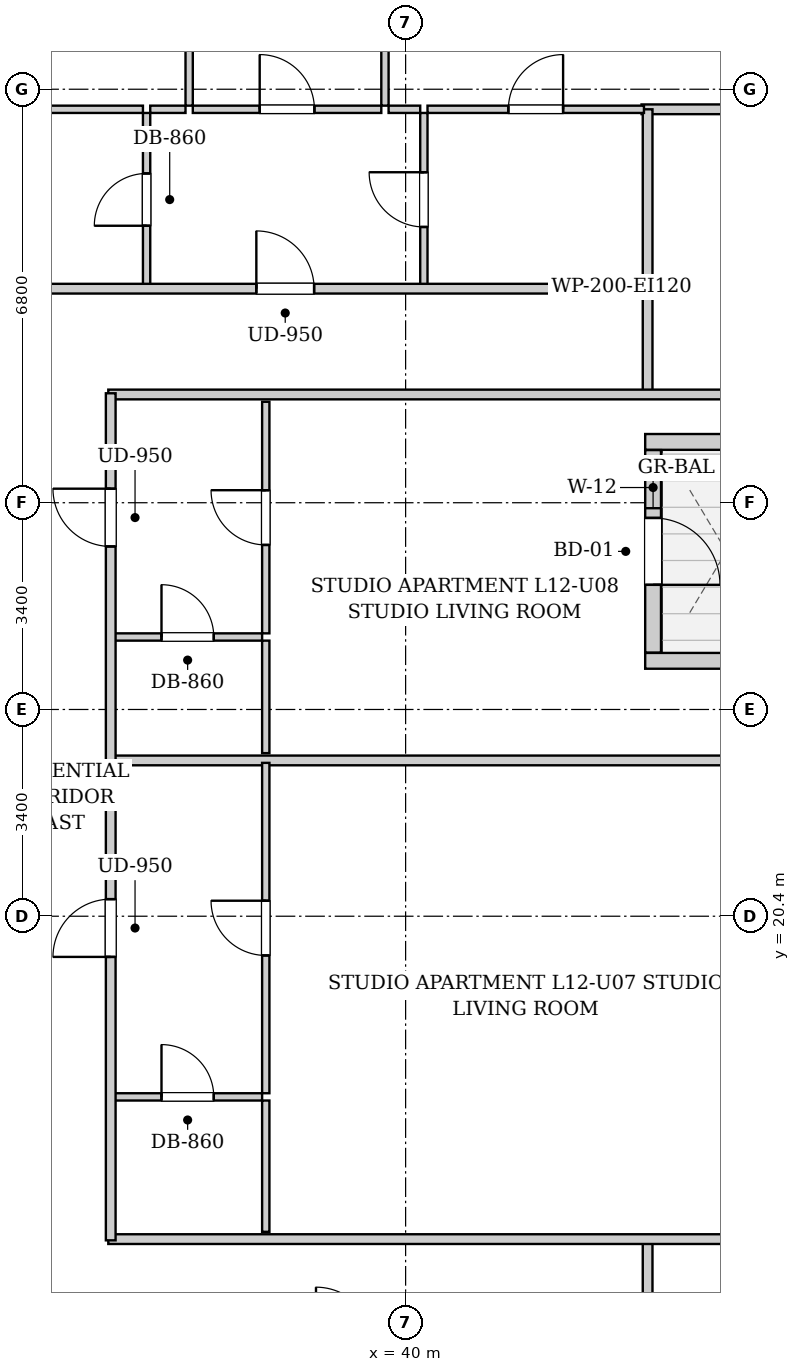
"""IFC4 building model, lengths in metres.
Left out: names, types, materials, properties, quantities, classifications, styles, units other than length and angle.
Written with IfcOpenShell. Run it as: python <this file> out.ifc"""

import sys

from ifc_helpers import new_model, si_unit, direction, frame, frame_2d, origin, place, context, subcontext, project, spatial, rectangle, extrude, element, fill, save


model = new_model("IFC4")
c1 = context("Model", 3, precision=1e-05, world=origin(), true_north=direction((0.0, 1.0)))
c2 = subcontext(c1, "Body", "Model", "MODEL_VIEW")
j1 = project(units=[si_unit("LENGTHUNIT", "METRE"), si_unit("PLANEANGLEUNIT", "RADIAN")], contexts=[c1])
p1 = place(None, origin())
s1 = spatial("IfcSite", under=j1, at=p1, CompositionType="ELEMENT")
p2 = place(p1, origin())
s2 = spatial("IfcBuilding", under=s1, at=p2, CompositionType="ELEMENT")
p3 = place(p2, frame((0.0, 0.0, 48.2)))
s3 = spatial("IfcBuildingStorey", under=s2, at=p3, CompositionType="ELEMENT", Elevation=48.2)
p4 = place(p3, frame((46.34, 28.2, 0.0), z_axis=(0.0, 0.0, 1.0), x_axis=(-1.0, 0.0, 0.0)))
e1 = element("IfcWall", 1, at=p4, inside=s3, PredefinedType="SOLIDWALL", context=c2, shape_type="SweptSolid", body=[
    extrude(rectangle(XDim=2.4, YDim=0.26, at=frame_2d((1.2, 0.0))), origin(), (0.0, 0.0, 1.0), 2.94),
])
p5 = place(p3, frame((44.07, 28.066, 0.0), z_axis=(0.0, 0.0, 1.0), x_axis=(0.0, -1.0, 0.0)))
e2 = element("IfcWall", 2, at=p5, inside=s3, PredefinedType="SOLIDWALL", context=c2, shape_type="SweptSolid", body=[
    extrude(rectangle(XDim=3.332, YDim=0.26, at=frame_2d((1.666, 0.0))), origin(), (0.0, 0.0, 1.0), 2.94),
])
p6 = place(p5, frame((1.116, 0.0, 0.0)))
e3 = element("IfcOpeningElement", 3, at=p6, cuts=e2, PredefinedType="OPENING", context=c2, shape_type="SweptSolid", body=[
    extrude(rectangle(XDim=1.1, YDim=2.0, at=frame_2d((0.55, 1.0))), frame((0.0, 0.14, 0.0), z_axis=(0.0, -1.0, 0.0), x_axis=(1.0, 0.0, 0.0)), (0.0, 0.0, 1.0), 0.28),
])
p7 = place(p5, frame((0.276, 0.0, 0.55)))
e4 = element("IfcOpeningElement", 4, at=p7, cuts=e2, PredefinedType="OPENING", context=c2, shape_type="SweptSolid", body=[
    extrude(rectangle(XDim=0.68, YDim=1.2, at=frame_2d((0.34, 0.6))), frame((0.0, 0.14, 0.0), z_axis=(0.0, -1.0, 0.0), x_axis=(1.0, 0.0, 0.0)), (0.0, 0.0, 1.0), 0.28),
])
p8 = place(p3, frame((43.94, 24.6, 0.0), z_axis=(0.0, 0.0, 1.0), x_axis=(1.0, 0.0, 0.0)))
e5 = element("IfcWall", 5, at=p8, inside=s3, PredefinedType="SOLIDWALL", context=c2, shape_type="SweptSolid", body=[
    extrude(rectangle(XDim=2.4, YDim=0.26, at=frame_2d((1.2, 0.0))), origin(), (0.0, 0.0, 1.0), 2.94),
])
for number, where, z_axis, x_axis in (
    (6, (43.98, 13.35, 0.0), (0.0, 0.0, 1.0), (0.0, 1.0, 0.0)),
    (7, (43.98, 28.98, 0.0), (0.0, 0.0, 1.0), (0.0, 1.0, 0.0)),
):
    element("IfcWall", number, at=place(p3, frame(where, z_axis=z_axis, x_axis=x_axis)), inside=s3, PredefinedType="PARTITIONING", context=c2, shape_type="SweptSolid", body=[
        extrude(rectangle(XDim=1.74, YDim=0.16, at=frame_2d((0.87, 0.0))), origin(), (0.0, 0.0, 1.0), 2.94),
    ])
for number, where, z_axis, x_axis in (
    (8, (35.11, 15.09, 0.0), (0.0, 0.0, 1.0), (1.0, 0.0, 0.0)),
    (9, (35.11, 28.98, 0.0), (0.0, 0.0, 1.0), (1.0, 0.0, 0.0)),
):
    element("IfcWall", number, at=place(p3, frame(where, z_axis=z_axis, x_axis=x_axis)), inside=s3, PredefinedType="PARTITIONING", context=c2, shape_type="SweptSolid", body=[
        extrude(rectangle(XDim=11.11, YDim=0.16, at=frame_2d((5.555, 0.0))), origin(), (0.0, 0.0, 1.0), 2.232),
    ])
p9 = place(p3, frame((43.88, 33.67, 0.0), z_axis=(0.0, 0.0, 1.0), x_axis=(1.0, 0.0, 0.0)))
e10 = element("IfcWall", 10, at=p9, inside=s3, PredefinedType="PARTITIONING", context=c2, shape_type="SweptSolid", body=[
    extrude(rectangle(XDim=2.34, YDim=0.16, at=frame_2d((1.17, 0.0))), origin(), (0.0, 0.0, 1.0), 2.94),
])
p10 = place(p3, frame((43.98, 30.76, 0.0), z_axis=(0.0, 0.0, 1.0), x_axis=(0.0, 1.0, 0.0)))
e11 = element("IfcWall", 11, at=p10, inside=s3, PredefinedType="PARTITIONING", context=c2, shape_type="SweptSolid", body=[
    extrude(rectangle(XDim=2.91, YDim=0.16, at=frame_2d((1.455, 0.0))), origin(), (0.0, 0.0, 1.0), 2.94),
])
p11 = place(p3, frame((35.74, 30.76, 0.0), z_axis=(0.0, 0.0, 1.0), x_axis=(0.0, 1.0, 0.0)))
e12 = element("IfcWall", 12, at=p11, inside=s3, PredefinedType="PARTITIONING", context=c2, shape_type="SweptSolid", body=[
    extrude(rectangle(XDim=2.85, YDim=0.12, at=frame_2d((1.425, 0.0))), origin(), (0.0, 0.0, 1.0), 2.94),
])
p12 = place(p11, frame((0.995, 0.0, 0.0)))
e13 = element("IfcOpeningElement", 13, at=p12, cuts=e12, PredefinedType="OPENING", context=c2, shape_type="SweptSolid", body=[
    extrude(rectangle(XDim=0.86, YDim=2.05, at=frame_2d((0.43, 1.025))), frame((0.0, 0.07, 0.0), z_axis=(0.0, -1.0, 0.0), x_axis=(1.0, 0.0, 0.0)), (0.0, 0.0, 1.0), 0.14),
])
p13 = place(p3, frame((33.28, 33.67, 0.0), z_axis=(0.0, 0.0, 1.0), x_axis=(1.0, 0.0, 0.0)))
e14 = element("IfcWall", 14, at=p13, inside=s3, PredefinedType="PARTITIONING", context=c2, shape_type="SweptSolid", body=[
    extrude(rectangle(XDim=2.4, YDim=0.12, at=frame_2d((1.2, 0.0))), origin(), (0.0, 0.0, 1.0), 2.94),
])
p14 = place(p3, frame((40.3, 30.76, 0.0), z_axis=(0.0, 0.0, 1.0), x_axis=(0.0, 1.0, 0.0)))
e15 = element("IfcWall", 15, at=p14, inside=s3, PredefinedType="PARTITIONING", context=c2, shape_type="SweptSolid", body=[
    extrude(rectangle(XDim=2.85, YDim=0.12, at=frame_2d((1.425, 0.0))), origin(), (0.0, 0.0, 1.0), 2.94),
])
p15 = place(p14, frame((0.975, 0.0, 0.0)))
e16 = element("IfcOpeningElement", 16, at=p15, cuts=e15, PredefinedType="OPENING", context=c2, shape_type="SweptSolid", body=[
    extrude(rectangle(XDim=0.9, YDim=2.05, at=frame_2d((0.45, 1.025))), frame((0.0, 0.07, 0.0), z_axis=(0.0, -1.0, 0.0), x_axis=(1.0, 0.0, 0.0)), (0.0, 0.0, 1.0), 0.14),
])
p16 = place(p3, frame((35.8, 33.67, 0.0), z_axis=(0.0, 0.0, 1.0), x_axis=(1.0, 0.0, 0.0)))
e17 = element("IfcWall", 17, at=p16, inside=s3, PredefinedType="PARTITIONING", context=c2, shape_type="SweptSolid", body=[
    extrude(rectangle(XDim=0.58, YDim=0.12, at=frame_2d((0.29, 0.0))), origin(), (0.0, 0.0, 1.0), 2.94),
])
p17 = place(p3, frame((36.5, 33.67, 0.0), z_axis=(0.0, 0.0, 1.0), x_axis=(1.0, 0.0, 0.0)))
e18 = element("IfcWall", 18, at=p17, inside=s3, PredefinedType="PARTITIONING", context=c2, shape_type="SweptSolid", body=[
    extrude(rectangle(XDim=3.1, YDim=0.12, at=frame_2d((1.55, 0.0))), origin(), (0.0, 0.0, 1.0), 2.94),
])
p18 = place(p17, frame((1.1, 0.0, 0.0)))
e19 = element("IfcOpeningElement", 19, at=p18, cuts=e18, PredefinedType="OPENING", context=c2, shape_type="SweptSolid", body=[
    extrude(rectangle(XDim=0.9, YDim=2.05, at=frame_2d((0.45, 1.025))), frame((0.0, 0.07, 0.0), z_axis=(0.0, -1.0, 0.0), x_axis=(1.0, 0.0, 0.0)), (0.0, 0.0, 1.0), 0.14),
])
p19 = place(p3, frame((39.72, 33.67, 0.0), z_axis=(0.0, 0.0, 1.0), x_axis=(1.0, 0.0, 0.0)))
e20 = element("IfcWall", 20, at=p19, inside=s3, PredefinedType="PARTITIONING", context=c2, shape_type="SweptSolid", body=[
    extrude(rectangle(XDim=0.52, YDim=0.12, at=frame_2d((0.26, 0.0))), origin(), (0.0, 0.0, 1.0), 2.94),
])
p20 = place(p3, frame((40.36, 33.67, 0.0), z_axis=(0.0, 0.0, 1.0), x_axis=(1.0, 0.0, 0.0)))
e21 = element("IfcWall", 21, at=p20, inside=s3, PredefinedType="PARTITIONING", context=c2, shape_type="SweptSolid", body=[
    extrude(rectangle(XDim=3.56, YDim=0.12, at=frame_2d((1.78, 0.0))), origin(), (0.0, 0.0, 1.0), 2.94),
])
p21 = place(p20, frame((1.33, 0.0, 0.0)))
e22 = element("IfcOpeningElement", 22, at=p21, cuts=e21, PredefinedType="OPENING", context=c2, shape_type="SweptSolid", body=[
    extrude(rectangle(XDim=0.9, YDim=2.05, at=frame_2d((0.45, 1.025))), frame((0.0, 0.07, 0.0), z_axis=(0.0, -1.0, 0.0), x_axis=(1.0, 0.0, 0.0)), (0.0, 0.0, 1.0), 0.14),
])
p22 = place(p3, frame((36.44, 33.73, 0.0), z_axis=(0.0, 0.0, 1.0), x_axis=(0.0, 1.0, 0.0)))
e23 = element("IfcWall", 23, at=p22, inside=s3, PredefinedType="PARTITIONING", context=c2, shape_type="SweptSolid", body=[
    extrude(rectangle(XDim=11.44, YDim=0.12, at=frame_2d((5.72, 0.0))), origin(), (0.0, 0.0, 1.0), 2.94),
])
p23 = place(p22, frame((5.27, 0.0, 0.0)))
e24 = element("IfcOpeningElement", 24, at=p23, cuts=e23, PredefinedType="OPENING", context=c2, shape_type="SweptSolid", body=[
    extrude(rectangle(XDim=0.9, YDim=2.05, at=frame_2d((0.45, 1.025))), frame((0.0, 0.07, 0.0), z_axis=(0.0, -1.0, 0.0), x_axis=(1.0, 0.0, 0.0)), (0.0, 0.0, 1.0), 0.14),
])
p24 = place(p3, frame((39.66, 33.73, 0.0), z_axis=(0.0, 0.0, 1.0), x_axis=(0.0, 1.0, 0.0)))
e25 = element("IfcWall", 25, at=p24, inside=s3, PredefinedType="PARTITIONING", context=c2, shape_type="SweptSolid", body=[
    extrude(rectangle(XDim=11.44, YDim=0.12, at=frame_2d((5.72, 0.0))), origin(), (0.0, 0.0, 1.0), 2.94),
])
p25 = place(p24, frame((5.27, 0.0, 0.0)))
e26 = element("IfcOpeningElement", 26, at=p25, cuts=e25, PredefinedType="OPENING", context=c2, shape_type="SweptSolid", body=[
    extrude(rectangle(XDim=0.9, YDim=2.05, at=frame_2d((0.45, 1.025))), frame((0.0, 0.07, 0.0), z_axis=(0.0, -1.0, 0.0), x_axis=(1.0, 0.0, 0.0)), (0.0, 0.0, 1.0), 0.14),
])
p26 = place(p3, frame((35.19, 22.962, 0.0), z_axis=(0.0, 0.0, 1.0), x_axis=(1.0, 0.0, 0.0)))
e27 = element("IfcWall", 27, at=p26, inside=s3, PredefinedType="PARTITIONING", context=c2, shape_type="SweptSolid", body=[
    extrude(rectangle(XDim=11.03, YDim=0.16, at=frame_2d((5.515, 0.0))), origin(), (0.0, 0.0, 1.0), 2.94),
])
p27 = place(p3, frame((35.19, 17.429, 0.0), z_axis=(0.0, 0.0, 1.0), x_axis=(1.0, 0.0, 0.0)))
e28 = element("IfcWall", 28, at=p27, inside=s3, PredefinedType="PARTITIONING", context=c2, shape_type="SweptSolid", body=[
    extrude(rectangle(XDim=2.45, YDim=0.12, at=frame_2d((1.225, 0.0))), origin(), (0.0, 0.0, 1.0), 2.94),
])
p28 = place(p27, frame((0.795, 0.0, 0.0)))
e29 = element("IfcOpeningElement", 29, at=p28, cuts=e28, PredefinedType="OPENING", context=c2, shape_type="SweptSolid", body=[
    extrude(rectangle(XDim=0.86, YDim=2.05, at=frame_2d((0.43, 1.025))), frame((0.0, 0.07, 0.0), z_axis=(0.0, -1.0, 0.0), x_axis=(1.0, 0.0, 0.0)), (0.0, 0.0, 1.0), 0.14),
])
p29 = place(p3, frame((37.7, 15.21, 0.0), z_axis=(0.0, 0.0, 1.0), x_axis=(0.0, 1.0, 0.0)))
e30 = element("IfcWall", 30, at=p29, inside=s3, PredefinedType="PARTITIONING", context=c2, shape_type="SweptSolid", body=[
    extrude(rectangle(XDim=2.159, YDim=0.12, at=frame_2d((1.08, 0.0))), origin(), (0.0, 0.0, 1.0), 2.94),
])
p30 = place(p3, frame((37.7, 17.489, 0.0), z_axis=(0.0, 0.0, 1.0), x_axis=(0.0, 1.0, 0.0)))
e31 = element("IfcWall", 31, at=p30, inside=s3, PredefinedType="PARTITIONING", context=c2, shape_type="SweptSolid", body=[
    extrude(rectangle(XDim=5.433, YDim=0.12, at=frame_2d((2.717, 0.0))), origin(), (0.0, 0.0, 1.0), 2.94),
])
p31 = place(p30, frame((2.266, 0.0, 0.0)))
e32 = element("IfcOpeningElement", 32, at=p31, cuts=e31, PredefinedType="OPENING", context=c2, shape_type="SweptSolid", body=[
    extrude(rectangle(XDim=0.9, YDim=2.05, at=frame_2d((0.45, 1.025))), frame((0.0, 0.07, 0.0), z_axis=(0.0, -1.0, 0.0), x_axis=(1.0, 0.0, 0.0)), (0.0, 0.0, 1.0), 0.14),
])
p32 = place(p3, frame((35.19, 24.992, 0.0), z_axis=(0.0, 0.0, 1.0), x_axis=(1.0, 0.0, 0.0)))
e33 = element("IfcWall", 33, at=p32, inside=s3, PredefinedType="PARTITIONING", context=c2, shape_type="SweptSolid", body=[
    extrude(rectangle(XDim=2.45, YDim=0.12, at=frame_2d((1.225, 0.0))), origin(), (0.0, 0.0, 1.0), 2.94),
])
p33 = place(p32, frame((0.795, 0.0, 0.0)))
e34 = element("IfcOpeningElement", 34, at=p33, cuts=e33, PredefinedType="OPENING", context=c2, shape_type="SweptSolid", body=[
    extrude(rectangle(XDim=0.86, YDim=2.05, at=frame_2d((0.43, 1.025))), frame((0.0, 0.07, 0.0), z_axis=(0.0, -1.0, 0.0), x_axis=(1.0, 0.0, 0.0)), (0.0, 0.0, 1.0), 0.14),
])
p34 = place(p3, frame((37.7, 23.082, 0.0), z_axis=(0.0, 0.0, 1.0), x_axis=(0.0, 1.0, 0.0)))
e35 = element("IfcWall", 35, at=p34, inside=s3, PredefinedType="PARTITIONING", context=c2, shape_type="SweptSolid", body=[
    extrude(rectangle(XDim=1.85, YDim=0.12, at=frame_2d((0.925, 0.0))), origin(), (0.0, 0.0, 1.0), 2.94),
])
p35 = place(p3, frame((37.7, 25.052, 0.0), z_axis=(0.0, 0.0, 1.0), x_axis=(0.0, 1.0, 0.0)))
e36 = element("IfcWall", 36, at=p35, inside=s3, PredefinedType="PARTITIONING", context=c2, shape_type="SweptSolid", body=[
    extrude(rectangle(XDim=3.808, YDim=0.12, at=frame_2d((1.904, 0.0))), origin(), (0.0, 0.0, 1.0), 2.94),
])
p36 = place(p35, frame((1.454, 0.0, 0.0)))
e37 = element("IfcOpeningElement", 37, at=p36, cuts=e36, PredefinedType="OPENING", context=c2, shape_type="SweptSolid", body=[
    extrude(rectangle(XDim=0.9, YDim=2.05, at=frame_2d((0.45, 1.025))), frame((0.0, 0.07, 0.0), z_axis=(0.0, -1.0, 0.0), x_axis=(1.0, 0.0, 0.0)), (0.0, 0.0, 1.0), 0.14),
])
p37 = place(p3, frame((10.05, 30.72, 0.0), z_axis=(0.0, 0.0, 1.0), x_axis=(1.0, 0.0, 0.0)))
e38 = element("IfcWall", 38, at=p37, inside=s3, PredefinedType="PARTITIONING", context=c2, shape_type="SweptSolid", body=[
    extrude(rectangle(XDim=33.9, YDim=0.16, at=frame_2d((16.95, 0.0))), origin(), (0.0, 0.0, 1.0), 2.94),
])
p38 = place(p37, frame((4.165, 0.0, 0.0)))
e39 = element("IfcOpeningElement", 39, at=p38, cuts=e38, PredefinedType="OPENING", context=c2, shape_type="SweptSolid", body=[
    extrude(rectangle(XDim=0.95, YDim=2.1, at=frame_2d((0.475, 1.05))), frame((0.0, 0.09, 0.0), z_axis=(0.0, -1.0, 0.0), x_axis=(1.0, 0.0, 0.0)), (0.0, 0.0, 1.0), 0.18),
])
p39 = place(p37, frame((27.495, 0.0, 0.0)))
e40 = element("IfcOpeningElement", 40, at=p39, cuts=e38, PredefinedType="OPENING", context=c2, shape_type="SweptSolid", body=[
    extrude(rectangle(XDim=0.95, YDim=2.1, at=frame_2d((0.475, 1.05))), frame((0.0, 0.09, 0.0), z_axis=(0.0, -1.0, 0.0), x_axis=(1.0, 0.0, 0.0)), (0.0, 0.0, 1.0), 0.18),
])
p40 = place(p3, frame((35.15, 15.07, 0.0), z_axis=(0.0, 0.0, 1.0), x_axis=(0.0, 1.0, 0.0)))
e41 = element("IfcWall", 41, at=p40, inside=s3, PredefinedType="PARTITIONING", context=c2, shape_type="SweptSolid", body=[
    extrude(rectangle(XDim=13.93, YDim=0.16, at=frame_2d((6.965, 0.0))), origin(), (0.0, 0.0, 1.0), 2.94),
])
p41 = place(p40, frame((4.661, 0.0, 0.0)))
e42 = element("IfcOpeningElement", 42, at=p41, cuts=e41, PredefinedType="OPENING", context=c2, shape_type="SweptSolid", body=[
    extrude(rectangle(XDim=0.95, YDim=2.1, at=frame_2d((0.475, 1.05))), frame((0.0, 0.09, 0.0), z_axis=(0.0, -1.0, 0.0), x_axis=(1.0, 0.0, 0.0)), (0.0, 0.0, 1.0), 0.18),
])
p42 = place(p40, frame((11.411, 0.0, 0.0)))
e43 = element("IfcOpeningElement", 43, at=p42, cuts=e41, PredefinedType="OPENING", context=c2, shape_type="SweptSolid", body=[
    extrude(rectangle(XDim=0.95, YDim=2.1, at=frame_2d((0.475, 1.05))), frame((0.0, 0.09, 0.0), z_axis=(0.0, -1.0, 0.0), x_axis=(1.0, 0.0, 0.0)), (0.0, 0.0, 1.0), 0.18),
])
p43 = place(p12, origin())
e44 = element("IfcDoor", 44, at=p43, inside=s3, OperationType="SINGLE_SWING_LEFT", PredefinedType="DOOR", context=c2, shape_type="SweptSolid", body=[
    extrude(rectangle(XDim=0.86, YDim=2.05, at=frame_2d((0.43, 1.025))), frame((0.0, 0.025, 0.0), z_axis=(0.0, -1.0, 0.0), x_axis=(1.0, 0.0, 0.0)), (0.0, 0.0, 1.0), 0.05),
])
fill(e13, e44)
p44 = place(p15, origin())
e45 = element("IfcDoor", 45, at=p44, inside=s3, OperationType="SINGLE_SWING_RIGHT", PredefinedType="DOOR", context=c2, shape_type="SweptSolid", body=[
    extrude(rectangle(XDim=0.9, YDim=2.05, at=frame_2d((0.45, 1.025))), frame((0.0, 0.025, 0.0), z_axis=(0.0, -1.0, 0.0), x_axis=(1.0, 0.0, 0.0)), (0.0, 0.0, 1.0), 0.05),
])
fill(e16, e45)
p45 = place(p18, origin())
e46 = element("IfcDoor", 46, at=p45, inside=s3, OperationType="SINGLE_SWING_LEFT", PredefinedType="DOOR", context=c2, shape_type="SweptSolid", body=[
    extrude(rectangle(XDim=0.9, YDim=2.05, at=frame_2d((0.45, 1.025))), frame((0.0, 0.025, 0.0), z_axis=(0.0, -1.0, 0.0), x_axis=(1.0, 0.0, 0.0)), (0.0, 0.0, 1.0), 0.05),
])
fill(e19, e46)
p46 = place(p21, origin())
e47 = element("IfcDoor", 47, at=p46, inside=s3, OperationType="SINGLE_SWING_RIGHT", PredefinedType="DOOR", context=c2, shape_type="SweptSolid", body=[
    extrude(rectangle(XDim=0.9, YDim=2.05, at=frame_2d((0.45, 1.025))), frame((0.0, 0.025, 0.0), z_axis=(0.0, -1.0, 0.0), x_axis=(1.0, 0.0, 0.0)), (0.0, 0.0, 1.0), 0.05),
])
fill(e22, e47)
p47 = place(p28, origin())
e48 = element("IfcDoor", 48, at=p47, inside=s3, OperationType="SINGLE_SWING_LEFT", PredefinedType="DOOR", context=c2, shape_type="SweptSolid", body=[
    extrude(rectangle(XDim=0.86, YDim=2.05, at=frame_2d((0.43, 1.025))), frame((0.0, 0.025, 0.0), z_axis=(0.0, -1.0, 0.0), x_axis=(1.0, 0.0, 0.0)), (0.0, 0.0, 1.0), 0.05),
])
fill(e29, e48)
p48 = place(p31, origin())
e49 = element("IfcDoor", 49, at=p48, inside=s3, OperationType="SINGLE_SWING_RIGHT", PredefinedType="DOOR", context=c2, shape_type="SweptSolid", body=[
    extrude(rectangle(XDim=0.9, YDim=2.05, at=frame_2d((0.45, 1.025))), frame((0.0, 0.025, 0.0), z_axis=(0.0, -1.0, 0.0), x_axis=(1.0, 0.0, 0.0)), (0.0, 0.0, 1.0), 0.05),
])
fill(e32, e49)
p49 = place(p33, origin())
e50 = element("IfcDoor", 50, at=p49, inside=s3, OperationType="SINGLE_SWING_LEFT", PredefinedType="DOOR", context=c2, shape_type="SweptSolid", body=[
    extrude(rectangle(XDim=0.86, YDim=2.05, at=frame_2d((0.43, 1.025))), frame((0.0, 0.025, 0.0), z_axis=(0.0, -1.0, 0.0), x_axis=(1.0, 0.0, 0.0)), (0.0, 0.0, 1.0), 0.05),
])
fill(e34, e50)
p50 = place(p36, origin())
e51 = element("IfcDoor", 51, at=p50, inside=s3, OperationType="SINGLE_SWING_RIGHT", PredefinedType="DOOR", context=c2, shape_type="SweptSolid", body=[
    extrude(rectangle(XDim=0.9, YDim=2.05, at=frame_2d((0.45, 1.025))), frame((0.0, 0.025, 0.0), z_axis=(0.0, -1.0, 0.0), x_axis=(1.0, 0.0, 0.0)), (0.0, 0.0, 1.0), 0.05),
])
fill(e37, e51)
p51 = place(p39, origin())
e52 = element("IfcDoor", 52, at=p51, inside=s3, OperationType="SINGLE_SWING_LEFT", PredefinedType="DOOR", context=c2, shape_type="SweptSolid", body=[
    extrude(rectangle(XDim=0.95, YDim=2.1, at=frame_2d((0.475, 1.05))), frame((0.0, 0.025, 0.0), z_axis=(0.0, -1.0, 0.0), x_axis=(1.0, 0.0, 0.0)), (0.0, 0.0, 1.0), 0.05),
])
fill(e40, e52)
p52 = place(p41, origin())
e53 = element("IfcDoor", 53, at=p52, inside=s3, OperationType="SINGLE_SWING_LEFT", PredefinedType="DOOR", context=c2, shape_type="SweptSolid", body=[
    extrude(rectangle(XDim=0.95, YDim=2.1, at=frame_2d((0.475, 1.05))), frame((0.0, 0.025, 0.0), z_axis=(0.0, -1.0, 0.0), x_axis=(1.0, 0.0, 0.0)), (0.0, 0.0, 1.0), 0.05),
])
fill(e42, e53)
p53 = place(p42, origin())
e54 = element("IfcDoor", 54, at=p53, inside=s3, OperationType="SINGLE_SWING_RIGHT", PredefinedType="DOOR", context=c2, shape_type="SweptSolid", body=[
    extrude(rectangle(XDim=0.95, YDim=2.1, at=frame_2d((0.475, 1.05))), frame((0.0, 0.025, 0.0), z_axis=(0.0, -1.0, 0.0), x_axis=(1.0, 0.0, 0.0)), (0.0, 0.0, 1.0), 0.05),
])
fill(e43, e54)
p54 = place(p6, origin())
e55 = element("IfcDoor", 55, at=p54, inside=s3, OperationType="SINGLE_SWING_RIGHT", PredefinedType="DOOR", context=c2, shape_type="SweptSolid", body=[
    extrude(rectangle(XDim=1.1, YDim=2.0, at=frame_2d((0.55, 1.0))), frame((0.0, 0.025, 0.0), z_axis=(0.0, -1.0, 0.0), x_axis=(1.0, 0.0, 0.0)), (0.0, 0.0, 1.0), 0.05),
])
fill(e3, e55)
p55 = place(p7, origin())
e56 = element("IfcWindow", 56, at=p55, inside=s3, PartitioningType="SINGLE_PANEL", PredefinedType="WINDOW", context=c2, shape_type="SweptSolid", body=[
    extrude(rectangle(XDim=0.68, YDim=1.2, at=frame_2d((0.34, 0.6))), frame((0.0, 0.03, 0.0), z_axis=(0.0, -1.0, 0.0), x_axis=(1.0, 0.0, 0.0)), (0.0, 0.0, 1.0), 0.06),
])
fill(e4, e56)
save(model, sys.argv[1])
